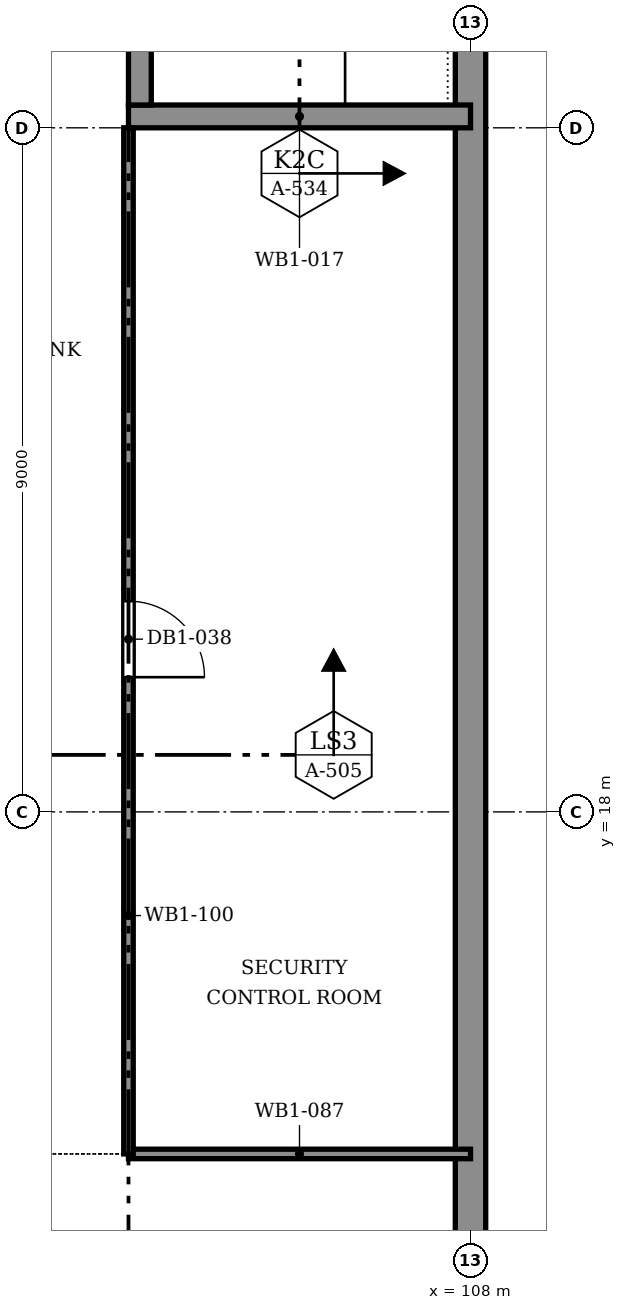
"""IFC4 building model, lengths in metres.
Left out: names, types, materials, properties, quantities, classifications, styles, units other than length and angle.
Written with IfcOpenShell. Run it as: python <this file> out.ifc"""

import sys

from ifc_helpers import new_model, si_unit, direction, frame, frame_2d, origin, place, context, subcontext, project, spatial, rectangle, extrude, element, fill, save


model = new_model("IFC4")
c1 = context("Model", 3, precision=1e-05, world=origin(), true_north=direction((0.0, 1.0)))
c2 = subcontext(c1, "Body", "Model", "MODEL_VIEW")
j1 = project(units=[si_unit("LENGTHUNIT", "METRE"), si_unit("PLANEANGLEUNIT", "RADIAN")], contexts=[c1])
p1 = place(None, origin())
s1 = spatial("IfcSite", under=j1, at=p1, CompositionType="ELEMENT")
p2 = place(p1, origin())
s2 = spatial("IfcBuilding", under=s1, at=p2, CompositionType="ELEMENT")
p3 = place(p2, frame((0.0, 0.0, -4.8)))
s3 = spatial("IfcBuildingStorey", under=s2, at=p3, CompositionType="ELEMENT", Elevation=-4.8)
p4 = place(p3, frame((108.0, 0.0, 0.0), z_axis=(0.0, 0.0, 1.0), x_axis=(0.0, 1.0, 0.0)))
e1 = element("IfcWall", 1, at=p4, inside=s3, PredefinedType="SOLIDWALL", context=c2, shape_type="SweptSolid", body=[
    extrude(rectangle(XDim=63.0, YDim=0.4, at=frame_2d((31.5, 0.0))), origin(), (0.0, 0.0, 1.0), 4.8),
])
p5 = place(p3, frame((103.5, 27.15, 0.0), z_axis=(0.0, 0.0, 1.0), x_axis=(1.0, 0.0, 0.0)))
e2 = element("IfcWall", 2, at=p5, inside=s3, PredefinedType="SOLIDWALL", context=c2, shape_type="SweptSolid", body=[
    extrude(rectangle(XDim=4.5, YDim=0.3, at=frame_2d((2.25, 0.0))), origin(), (0.0, 0.0, 1.0), 4.8),
])
p6 = place(p3, frame((103.65, 27.3, 0.0), z_axis=(0.0, 0.0, 1.0), x_axis=(0.0, 1.0, 0.0)))
e3 = element("IfcWall", 3, at=p6, inside=s3, PredefinedType="SOLIDWALL", context=c2, shape_type="SweptSolid", body=[
    extrude(rectangle(XDim=8.4, YDim=0.3, at=frame_2d((4.2, 0.0))), origin(), (0.0, 0.0, 1.0), 4.8),
])
p7 = place(p3, frame((103.5, 13.5, 0.0), z_axis=(0.0, 0.0, 1.0), x_axis=(1.0, 0.0, 0.0)))
e4 = element("IfcWall", 4, at=p7, inside=s3, PredefinedType="PARTITIONING", context=c2, shape_type="SweptSolid", body=[
    extrude(rectangle(XDim=4.5, YDim=0.125, at=frame_2d((2.25, 0.0))), origin(), (0.0, 0.0, 1.0), 4.181),
])
p8 = place(p3, frame((103.5, 13.5, 0.0), z_axis=(0.0, 0.0, 1.0), x_axis=(0.0, 1.0, 0.0)))
e5 = element("IfcWall", 5, at=p8, inside=s3, PredefinedType="PARTITIONING", context=c2, shape_type="SweptSolid", body=[
    extrude(rectangle(XDim=13.5, YDim=0.125, at=frame_2d((6.75, 0.0))), origin(), (0.0, 0.0, 1.0), 4.023),
])
p9 = place(p8, frame((6.272, 0.0, 0.0)))
e6 = element("IfcOpeningElement", 6, at=p9, cuts=e5, PredefinedType="OPENING", context=c2, shape_type="SweptSolid", body=[
    extrude(rectangle(XDim=1.0, YDim=2.1, at=frame_2d((0.5, 1.05))), frame((0.0, 0.073, 0.0), z_axis=(0.0, -1.0, 0.0), x_axis=(1.0, 0.0, 0.0)), (0.0, 0.0, 1.0), 0.145),
])
p10 = place(p9, frame((1.0, 0.0, 0.0), z_axis=(0.0, 0.0, 1.0), x_axis=(-1.0, 0.0, 0.0)))
e7 = element("IfcDoor", 7, at=p10, inside=s3, OperationType="SINGLE_SWING_LEFT", PredefinedType="DOOR", context=c2, shape_type="SweptSolid", body=[
    extrude(rectangle(XDim=1.0, YDim=2.1, at=frame_2d((0.5, 1.05))), frame((0.0, 0.025, 0.0), z_axis=(0.0, -1.0, 0.0), x_axis=(1.0, 0.0, 0.0)), (0.0, 0.0, 1.0), 0.05),
])
fill(e6, e7)
save(model, sys.argv[1])
